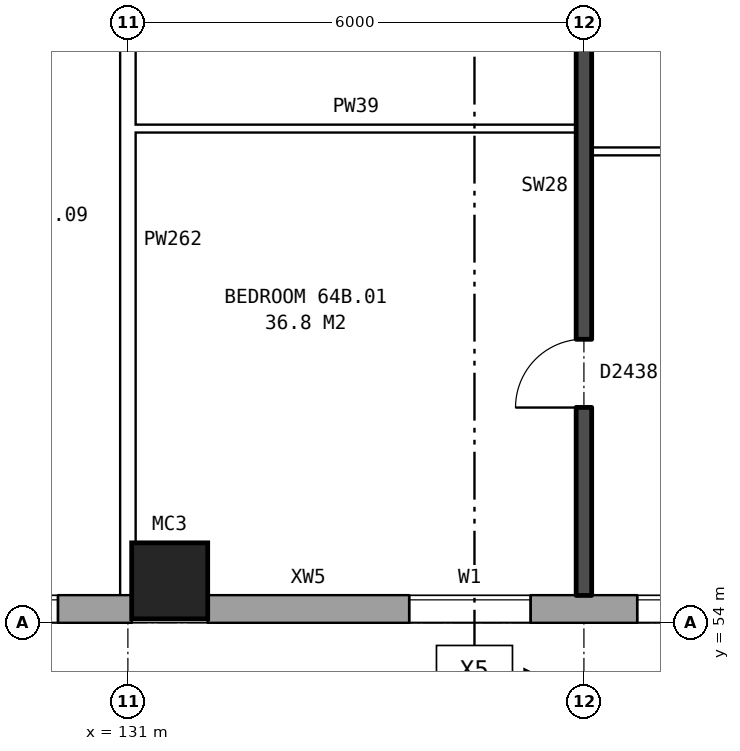
"""IFC4 building model, lengths in metres.
Left out: names, types, materials, properties, quantities, classifications, styles, units other than length and angle.
Written with IfcOpenShell. Run it as: python <this file> out.ifc"""

import sys

from ifc_helpers import new_model, si_unit, direction, frame, frame_2d, origin, origin_2d, place, context, subcontext, project, spatial, rectangle, hollow_rectangle, extrude, element, fill, save


model = new_model("IFC4")
c1 = context("Model", 3, precision=1e-05, world=origin(), true_north=direction((0.0, 1.0)))
c2 = subcontext(c1, "Body", "Model", "MODEL_VIEW")
j1 = project(units=[si_unit("LENGTHUNIT", "METRE"), si_unit("PLANEANGLEUNIT", "RADIAN")], contexts=[c1])
p1 = place(None, origin())
s1 = spatial("IfcSite", under=j1, at=p1, CompositionType="ELEMENT")
p2 = place(p1, origin())
s2 = spatial("IfcBuilding", under=s1, at=p2, CompositionType="ELEMENT")
p3 = place(p2, frame((0.0, 0.0, 227.6)))
s3 = spatial("IfcBuildingStorey", under=s2, at=p3, CompositionType="ELEMENT", Elevation=227.6)
p4 = place(p3, frame((131.55, 54.55, 0.0), z_axis=(0.0, 0.0, 1.0), x_axis=(1.0, 0.0, 0.0)))
e1 = element("IfcColumn", 1, at=p4, inside=s3, PredefinedType="COLUMN", context=c2, shape_type="SweptSolid", body=[
    extrude(hollow_rectangle(XDim=1.0, YDim=1.0, WallThickness=0.055, at=origin_2d()), origin(), (0.0, 0.0, 1.0), 3.1),
])
p5 = place(p3, frame((75.95, 54.18, 0.0), z_axis=(0.0, 0.0, 1.0), x_axis=(1.0, 0.0, 0.0)))
e2 = element("IfcWall", 2, at=p5, inside=s3, PredefinedType="STANDARD", context=c2, shape_type="SweptSolid", body=[
    extrude(rectangle(XDim=55.1, YDim=0.36, at=frame_2d((27.55, 0.0))), origin(), (0.0, 0.0, 1.0), 2.85),
])
p6 = place(p5, frame((0.969, 0.0, 0.8)))
e3 = element("IfcOpeningElement", 3, at=p6, cuts=e2, PredefinedType="OPENING", context=c2, shape_type="SweptSolid", body=[
    extrude(rectangle(XDim=1.6, YDim=1.8, at=frame_2d((0.8, 0.9))), frame((0.0, 0.19, 0.0), z_axis=(0.0, -1.0, 0.0), x_axis=(1.0, 0.0, 0.0)), (0.0, 0.0, 1.0), 0.38),
])
p7 = place(p5, frame((4.406, 0.0, 0.8)))
e4 = element("IfcOpeningElement", 4, at=p7, cuts=e2, PredefinedType="OPENING", context=c2, shape_type="SweptSolid", body=[
    extrude(rectangle(XDim=1.6, YDim=1.8, at=frame_2d((0.8, 0.9))), frame((0.0, 0.19, 0.0), z_axis=(0.0, -1.0, 0.0), x_axis=(1.0, 0.0, 0.0)), (0.0, 0.0, 1.0), 0.38),
])
p8 = place(p5, frame((7.844, 0.0, 0.8)))
e5 = element("IfcOpeningElement", 5, at=p8, cuts=e2, PredefinedType="OPENING", context=c2, shape_type="SweptSolid", body=[
    extrude(rectangle(XDim=1.6, YDim=1.8, at=frame_2d((0.8, 0.9))), frame((0.0, 0.19, 0.0), z_axis=(0.0, -1.0, 0.0), x_axis=(1.0, 0.0, 0.0)), (0.0, 0.0, 1.0), 0.38),
])
p9 = place(p5, frame((11.281, 0.0, 0.8)))
e6 = element("IfcOpeningElement", 6, at=p9, cuts=e2, PredefinedType="OPENING", context=c2, shape_type="SweptSolid", body=[
    extrude(rectangle(XDim=1.6, YDim=1.8, at=frame_2d((0.8, 0.9))), frame((0.0, 0.19, 0.0), z_axis=(0.0, -1.0, 0.0), x_axis=(1.0, 0.0, 0.0)), (0.0, 0.0, 1.0), 0.38),
])
p10 = place(p5, frame((14.719, 0.0, 0.8)))
e7 = element("IfcOpeningElement", 7, at=p10, cuts=e2, PredefinedType="OPENING", context=c2, shape_type="SweptSolid", body=[
    extrude(rectangle(XDim=1.6, YDim=1.8, at=frame_2d((0.8, 0.9))), frame((0.0, 0.19, 0.0), z_axis=(0.0, -1.0, 0.0), x_axis=(1.0, 0.0, 0.0)), (0.0, 0.0, 1.0), 0.38),
])
p11 = place(p5, frame((18.156, 0.0, 0.8)))
e8 = element("IfcOpeningElement", 8, at=p11, cuts=e2, PredefinedType="OPENING", context=c2, shape_type="SweptSolid", body=[
    extrude(rectangle(XDim=1.6, YDim=1.8, at=frame_2d((0.8, 0.9))), frame((0.0, 0.19, 0.0), z_axis=(0.0, -1.0, 0.0), x_axis=(1.0, 0.0, 0.0)), (0.0, 0.0, 1.0), 0.38),
])
p12 = place(p5, frame((21.594, 0.0, 0.8)))
e9 = element("IfcOpeningElement", 9, at=p12, cuts=e2, PredefinedType="OPENING", context=c2, shape_type="SweptSolid", body=[
    extrude(rectangle(XDim=1.6, YDim=1.8, at=frame_2d((0.8, 0.9))), frame((0.0, 0.19, 0.0), z_axis=(0.0, -1.0, 0.0), x_axis=(1.0, 0.0, 0.0)), (0.0, 0.0, 1.0), 0.38),
])
p13 = place(p5, frame((25.031, 0.0, 0.8)))
e10 = element("IfcOpeningElement", 10, at=p13, cuts=e2, PredefinedType="OPENING", context=c2, shape_type="SweptSolid", body=[
    extrude(rectangle(XDim=1.6, YDim=1.8, at=frame_2d((0.8, 0.9))), frame((0.0, 0.19, 0.0), z_axis=(0.0, -1.0, 0.0), x_axis=(1.0, 0.0, 0.0)), (0.0, 0.0, 1.0), 0.38),
])
p14 = place(p5, frame((28.469, 0.0, 0.8)))
e11 = element("IfcOpeningElement", 11, at=p14, cuts=e2, PredefinedType="OPENING", context=c2, shape_type="SweptSolid", body=[
    extrude(rectangle(XDim=1.6, YDim=1.8, at=frame_2d((0.8, 0.9))), frame((0.0, 0.19, 0.0), z_axis=(0.0, -1.0, 0.0), x_axis=(1.0, 0.0, 0.0)), (0.0, 0.0, 1.0), 0.38),
])
p15 = place(p5, frame((31.906, 0.0, 0.8)))
e12 = element("IfcOpeningElement", 12, at=p15, cuts=e2, PredefinedType="OPENING", context=c2, shape_type="SweptSolid", body=[
    extrude(rectangle(XDim=1.6, YDim=1.8, at=frame_2d((0.8, 0.9))), frame((0.0, 0.19, 0.0), z_axis=(0.0, -1.0, 0.0), x_axis=(1.0, 0.0, 0.0)), (0.0, 0.0, 1.0), 0.38),
])
p16 = place(p5, frame((35.344, 0.0, 0.8)))
e13 = element("IfcOpeningElement", 13, at=p16, cuts=e2, PredefinedType="OPENING", context=c2, shape_type="SweptSolid", body=[
    extrude(rectangle(XDim=1.6, YDim=1.8, at=frame_2d((0.8, 0.9))), frame((0.0, 0.19, 0.0), z_axis=(0.0, -1.0, 0.0), x_axis=(1.0, 0.0, 0.0)), (0.0, 0.0, 1.0), 0.38),
])
p17 = place(p5, frame((38.781, 0.0, 0.8)))
e14 = element("IfcOpeningElement", 14, at=p17, cuts=e2, PredefinedType="OPENING", context=c2, shape_type="SweptSolid", body=[
    extrude(rectangle(XDim=1.6, YDim=1.8, at=frame_2d((0.8, 0.9))), frame((0.0, 0.19, 0.0), z_axis=(0.0, -1.0, 0.0), x_axis=(1.0, 0.0, 0.0)), (0.0, 0.0, 1.0), 0.38),
])
p18 = place(p5, frame((42.219, 0.0, 0.8)))
e15 = element("IfcOpeningElement", 15, at=p18, cuts=e2, PredefinedType="OPENING", context=c2, shape_type="SweptSolid", body=[
    extrude(rectangle(XDim=1.6, YDim=1.8, at=frame_2d((0.8, 0.9))), frame((0.0, 0.19, 0.0), z_axis=(0.0, -1.0, 0.0), x_axis=(1.0, 0.0, 0.0)), (0.0, 0.0, 1.0), 0.38),
])
p19 = place(p5, frame((45.656, 0.0, 0.8)))
e16 = element("IfcOpeningElement", 16, at=p19, cuts=e2, PredefinedType="OPENING", context=c2, shape_type="SweptSolid", body=[
    extrude(rectangle(XDim=1.6, YDim=1.8, at=frame_2d((0.8, 0.9))), frame((0.0, 0.19, 0.0), z_axis=(0.0, -1.0, 0.0), x_axis=(1.0, 0.0, 0.0)), (0.0, 0.0, 1.0), 0.38),
])
p20 = place(p5, frame((49.094, 0.0, 0.8)))
e17 = element("IfcOpeningElement", 17, at=p20, cuts=e2, PredefinedType="OPENING", context=c2, shape_type="SweptSolid", body=[
    extrude(rectangle(XDim=1.6, YDim=1.8, at=frame_2d((0.8, 0.9))), frame((0.0, 0.19, 0.0), z_axis=(0.0, -1.0, 0.0), x_axis=(1.0, 0.0, 0.0)), (0.0, 0.0, 1.0), 0.38),
])
p21 = place(p5, frame((52.531, 0.0, 0.8)))
e18 = element("IfcOpeningElement", 18, at=p21, cuts=e2, PredefinedType="OPENING", context=c2, shape_type="SweptSolid", body=[
    extrude(rectangle(XDim=1.6, YDim=1.8, at=frame_2d((0.8, 0.9))), frame((0.0, 0.19, 0.0), z_axis=(0.0, -1.0, 0.0), x_axis=(1.0, 0.0, 0.0)), (0.0, 0.0, 1.0), 0.38),
])
p22 = place(p3, frame((132.05, 54.18, 0.0), z_axis=(0.0, 0.0, 1.0), x_axis=(1.0, 0.0, 0.0)))
e19 = element("IfcWall", 19, at=p22, inside=s3, PredefinedType="STANDARD", context=c2, shape_type="SweptSolid", body=[
    extrude(rectangle(XDim=33.875, YDim=0.36, at=frame_2d((16.938, 0.0))), origin(), (0.0, 0.0, 1.0), 2.85),
])
p23 = place(p22, frame((2.65, 0.0, 0.8)))
e20 = element("IfcOpeningElement", 20, at=p23, cuts=e19, PredefinedType="OPENING", context=c2, shape_type="SweptSolid", body=[
    extrude(rectangle(XDim=1.6, YDim=1.8, at=frame_2d((0.8, 0.9))), frame((0.0, 0.19, 0.0), z_axis=(0.0, -1.0, 0.0), x_axis=(1.0, 0.0, 0.0)), (0.0, 0.0, 1.0), 0.38),
])
p24 = place(p22, frame((5.65, 0.0, 0.8)))
e21 = element("IfcOpeningElement", 21, at=p24, cuts=e19, PredefinedType="OPENING", context=c2, shape_type="SweptSolid", body=[
    extrude(rectangle(XDim=1.6, YDim=1.8, at=frame_2d((0.8, 0.9))), frame((0.0, 0.19, 0.0), z_axis=(0.0, -1.0, 0.0), x_axis=(1.0, 0.0, 0.0)), (0.0, 0.0, 1.0), 0.38),
])
p25 = place(p22, frame((8.65, 0.0, 0.8)))
e22 = element("IfcOpeningElement", 22, at=p25, cuts=e19, PredefinedType="OPENING", context=c2, shape_type="SweptSolid", body=[
    extrude(rectangle(XDim=1.6, YDim=1.8, at=frame_2d((0.8, 0.9))), frame((0.0, 0.19, 0.0), z_axis=(0.0, -1.0, 0.0), x_axis=(1.0, 0.0, 0.0)), (0.0, 0.0, 1.0), 0.38),
])
p26 = place(p22, frame((11.15, 0.0, 0.8)))
e23 = element("IfcOpeningElement", 23, at=p26, cuts=e19, PredefinedType="OPENING", context=c2, shape_type="SweptSolid", body=[
    extrude(rectangle(XDim=1.4, YDim=1.8, at=frame_2d((0.7, 0.9))), frame((0.0, 0.19, 0.0), z_axis=(0.0, -1.0, 0.0), x_axis=(1.0, 0.0, 0.0)), (0.0, 0.0, 1.0), 0.38),
])
p27 = place(p22, frame((15.05, 0.0, 0.8)))
e24 = element("IfcOpeningElement", 24, at=p27, cuts=e19, PredefinedType="OPENING", context=c2, shape_type="SweptSolid", body=[
    extrude(rectangle(XDim=1.6, YDim=1.8, at=frame_2d((0.8, 0.9))), frame((0.0, 0.19, 0.0), z_axis=(0.0, -1.0, 0.0), x_axis=(1.0, 0.0, 0.0)), (0.0, 0.0, 1.0), 0.38),
])
p28 = place(p22, frame((17.65, 0.0, 0.8)))
e25 = element("IfcOpeningElement", 25, at=p28, cuts=e19, PredefinedType="OPENING", context=c2, shape_type="SweptSolid", body=[
    extrude(rectangle(XDim=1.6, YDim=1.8, at=frame_2d((0.8, 0.9))), frame((0.0, 0.19, 0.0), z_axis=(0.0, -1.0, 0.0), x_axis=(1.0, 0.0, 0.0)), (0.0, 0.0, 1.0), 0.38),
])
p29 = place(p22, frame((20.1, 0.0, 0.35)))
e26 = element("IfcOpeningElement", 26, at=p29, cuts=e19, PredefinedType="OPENING", context=c2, shape_type="SweptSolid", body=[
    extrude(rectangle(XDim=1.0, YDim=1.8, at=frame_2d((0.5, 0.9))), frame((0.0, 0.19, 0.0), z_axis=(0.0, -1.0, 0.0), x_axis=(1.0, 0.0, 0.0)), (0.0, 0.0, 1.0), 0.38),
])
p30 = place(p22, frame((23.65, 0.0, 0.8)))
e27 = element("IfcOpeningElement", 27, at=p30, cuts=e19, PredefinedType="OPENING", context=c2, shape_type="SweptSolid", body=[
    extrude(rectangle(XDim=1.6, YDim=1.8, at=frame_2d((0.8, 0.9))), frame((0.0, 0.19, 0.0), z_axis=(0.0, -1.0, 0.0), x_axis=(1.0, 0.0, 0.0)), (0.0, 0.0, 1.0), 0.38),
])
p31 = place(p22, frame((26.65, 0.0, 0.8)))
e28 = element("IfcOpeningElement", 28, at=p31, cuts=e19, PredefinedType="OPENING", context=c2, shape_type="SweptSolid", body=[
    extrude(rectangle(XDim=1.6, YDim=1.8, at=frame_2d((0.8, 0.9))), frame((0.0, 0.19, 0.0), z_axis=(0.0, -1.0, 0.0), x_axis=(1.0, 0.0, 0.0)), (0.0, 0.0, 1.0), 0.38),
])
p32 = place(p22, frame((29.65, 0.0, 0.8)))
e29 = element("IfcOpeningElement", 29, at=p32, cuts=e19, PredefinedType="OPENING", context=c2, shape_type="SweptSolid", body=[
    extrude(rectangle(XDim=1.6, YDim=1.8, at=frame_2d((0.8, 0.9))), frame((0.0, 0.19, 0.0), z_axis=(0.0, -1.0, 0.0), x_axis=(1.0, 0.0, 0.0)), (0.0, 0.0, 1.0), 0.38),
])
p33 = place(p22, frame((12.85, 0.0, 1.7)))
e30 = element("IfcOpeningElement", 30, at=p33, cuts=e19, PredefinedType="OPENING", context=c2, shape_type="SweptSolid", body=[
    extrude(rectangle(XDim=0.6, YDim=0.9, at=frame_2d((0.3, 0.45))), frame((0.0, 0.19, 0.0), z_axis=(0.0, -1.0, 0.0), x_axis=(1.0, 0.0, 0.0)), (0.0, 0.0, 1.0), 0.38),
])
p34 = place(p3, frame((137.1, 60.2, 0.0), z_axis=(0.0, 0.0, 1.0), x_axis=(1.0, 0.0, 0.0)))
e31 = element("IfcWall", 31, at=p34, inside=s3, PredefinedType="PARTITIONING", context=c2, shape_type="SweptSolid", body=[
    extrude(rectangle(XDim=5.8, YDim=0.1, at=frame_2d((2.9, 0.0))), origin(), (0.0, 0.0, 1.0), 2.85),
])
p35 = place(p34, frame((1.3, 0.0, 0.0)))
e32 = element("IfcOpeningElement", 32, at=p35, cuts=e31, PredefinedType="OPENING", context=c2, shape_type="SweptSolid", body=[
    extrude(rectangle(XDim=0.9, YDim=2.1, at=frame_2d((0.45, 1.05))), frame((0.0, 0.06, 0.0), z_axis=(0.0, -1.0, 0.0), x_axis=(1.0, 0.0, 0.0)), (0.0, 0.0, 1.0), 0.12),
])
p36 = place(p34, frame((4.2, 0.0, 0.0)))
e33 = element("IfcOpeningElement", 33, at=p36, cuts=e31, PredefinedType="OPENING", context=c2, shape_type="SweptSolid", body=[
    extrude(rectangle(XDim=0.9, YDim=2.1, at=frame_2d((0.45, 1.05))), frame((0.0, 0.06, 0.0), z_axis=(0.0, -1.0, 0.0), x_axis=(1.0, 0.0, 0.0)), (0.0, 0.0, 1.0), 0.12),
])
p37 = place(p3, frame((131.1, 60.5, 0.0), z_axis=(0.0, 0.0, 1.0), x_axis=(1.0, 0.0, 0.0)))
e34 = element("IfcWall", 34, at=p37, inside=s3, PredefinedType="PARTITIONING", context=c2, shape_type="SweptSolid", body=[
    extrude(rectangle(XDim=5.8, YDim=0.1, at=frame_2d((2.9, 0.0))), origin(), (0.0, 0.0, 1.0), 2.85),
])
p38 = place(p3, frame((131.0, 54.36, 0.0), z_axis=(0.0, 0.0, 1.0), x_axis=(0.0, 1.0, 0.0)))
e35 = element("IfcWall", 35, at=p38, inside=s3, PredefinedType="PARTITIONING", context=c2, shape_type="SweptSolid", body=[
    extrude(rectangle(XDim=9.34, YDim=0.2, at=frame_2d((4.67, 0.0))), origin(), (0.0, 0.0, 1.0), 2.85),
])
p39 = place(p3, frame((137.0, 54.36, 0.0), z_axis=(0.0, 0.0, 1.0), x_axis=(0.0, 1.0, 0.0)))
e36 = element("IfcWall", 36, at=p39, inside=s3, PredefinedType="SOLIDWALL", context=c2, shape_type="SweptSolid", body=[
    extrude(rectangle(XDim=9.44, YDim=0.2, at=frame_2d((4.72, 0.0))), origin(), (0.0, 0.0, 1.0), 2.85),
])
p40 = place(p39, frame((2.47, 0.0, 0.0)))
e37 = element("IfcOpeningElement", 37, at=p40, cuts=e36, PredefinedType="OPENING", context=c2, shape_type="SweptSolid", body=[
    extrude(rectangle(XDim=0.9, YDim=2.1, at=frame_2d((0.45, 1.05))), frame((0.0, 0.11, 0.0), z_axis=(0.0, -1.0, 0.0), x_axis=(1.0, 0.0, 0.0)), (0.0, 0.0, 1.0), 0.22),
])
p41 = place(p39, frame((7.39, 0.0, 0.0)))
e38 = element("IfcOpeningElement", 38, at=p41, cuts=e36, PredefinedType="OPENING", context=c2, shape_type="SweptSolid", body=[
    extrude(rectangle(XDim=0.8, YDim=2.1, at=frame_2d((0.4, 1.05))), frame((0.0, 0.11, 0.0), z_axis=(0.0, -1.0, 0.0), x_axis=(1.0, 0.0, 0.0)), (0.0, 0.0, 1.0), 0.22),
])
p42 = place(p21, origin())
e39 = element("IfcWindow", 39, at=p42, inside=s3, PartitioningType="SINGLE_PANEL", PredefinedType="WINDOW", context=c2, shape_type="SweptSolid", body=[
    extrude(rectangle(XDim=1.6, YDim=1.8, at=frame_2d((0.8, 0.9))), frame((0.0, 0.15, 0.0), z_axis=(0.0, -1.0, 0.0), x_axis=(1.0, 0.0, 0.0)), (0.0, 0.0, 1.0), 0.06),
])
fill(e18, e39)
p43 = place(p23, origin())
e40 = element("IfcWindow", 40, at=p43, inside=s3, PartitioningType="SINGLE_PANEL", PredefinedType="WINDOW", context=c2, shape_type="SweptSolid", body=[
    extrude(rectangle(XDim=1.6, YDim=1.8, at=frame_2d((0.8, 0.9))), frame((0.0, 0.15, 0.0), z_axis=(0.0, -1.0, 0.0), x_axis=(1.0, 0.0, 0.0)), (0.0, 0.0, 1.0), 0.06),
])
fill(e20, e40)
p44 = place(p24, origin())
e41 = element("IfcWindow", 41, at=p44, inside=s3, PartitioningType="SINGLE_PANEL", PredefinedType="WINDOW", context=c2, shape_type="SweptSolid", body=[
    extrude(rectangle(XDim=1.6, YDim=1.8, at=frame_2d((0.8, 0.9))), frame((0.0, 0.15, 0.0), z_axis=(0.0, -1.0, 0.0), x_axis=(1.0, 0.0, 0.0)), (0.0, 0.0, 1.0), 0.06),
])
fill(e21, e41)
p45 = place(p40, origin())
e42 = element("IfcDoor", 42, at=p45, inside=s3, OperationType="SINGLE_SWING_LEFT", PredefinedType="DOOR", context=c2, shape_type="SweptSolid", body=[
    extrude(rectangle(XDim=0.9, YDim=2.1, at=frame_2d((0.45, 1.05))), frame((0.0, 0.025, 0.0), z_axis=(0.0, -1.0, 0.0), x_axis=(1.0, 0.0, 0.0)), (0.0, 0.0, 1.0), 0.05),
])
fill(e37, e42)
save(model, sys.argv[1])
